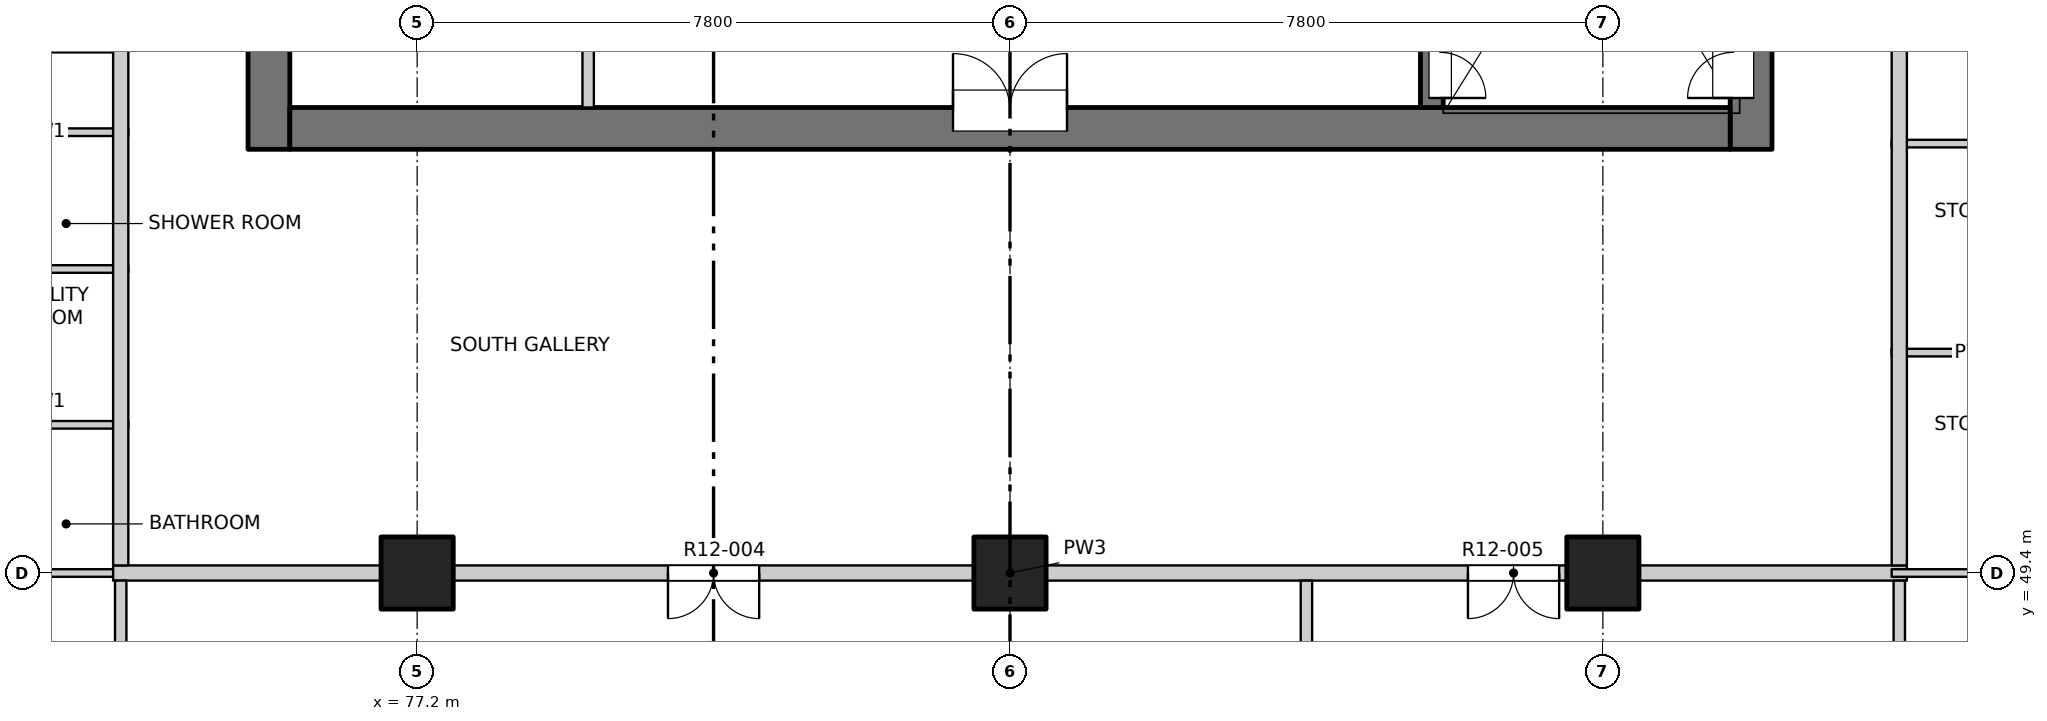
"""IFC4 building model, lengths in metres.
Left out: names, types, materials, properties, quantities, classifications, styles, units other than length and angle.
Written with IfcOpenShell. Run it as: python <this file> out.ifc"""

import sys

from ifc_helpers import new_model, si_unit, direction, frame, frame_2d, origin, origin_2d, place, context, subcontext, project, spatial, rectangle, extrude, element, fill, save


model = new_model("IFC4")
c1 = context("Model", 3, precision=1e-05, world=origin(), true_north=direction((0.0, 1.0)))
c2 = subcontext(c1, "Body", "Model", "MODEL_VIEW")
j1 = project(units=[si_unit("LENGTHUNIT", "METRE"), si_unit("PLANEANGLEUNIT", "RADIAN")], contexts=[c1])
p1 = place(None, origin())
s1 = spatial("IfcSite", under=j1, at=p1, CompositionType="ELEMENT")
p2 = place(p1, origin())
s2 = spatial("IfcBuilding", under=s1, at=p2, CompositionType="ELEMENT")
p3 = place(p2, frame((0.0, 0.0, 137.3)))
s3 = spatial("IfcBuildingStorey", under=s2, at=p3, CompositionType="ELEMENT", Elevation=137.3)
for number, where, z_axis, x_axis in (
    (1, (77.2, 49.4, -0.25), (0.0, 0.0, 1.0), (1.0, 0.0, 0.0)),
    (2, (85.0, 49.4, -0.25), (0.0, 0.0, 1.0), (1.0, 0.0, 0.0)),
    (3, (92.8, 49.4, -0.25), (0.0, 0.0, 1.0), (1.0, 0.0, 0.0)),
):
    element("IfcColumn", number, at=place(p3, frame(where, z_axis=z_axis, x_axis=x_axis)), inside=s3, PredefinedType="COLUMN", context=c2, shape_type="SweptSolid", body=[
        extrude(rectangle(XDim=0.95, YDim=0.95, at=origin_2d()), origin(), (0.0, 0.0, 1.0), 3.4),
    ])
p4 = place(p3, frame((75.25, 54.975, -0.25), z_axis=(0.0, 0.0, 1.0), x_axis=(0.0, 1.0, 0.0)))
e4 = element("IfcWall", 4, at=p4, inside=s3, PredefinedType="SOLIDWALL", context=c2, shape_type="SweptSolid", body=[
    extrude(rectangle(XDim=22.325, YDim=0.55, at=frame_2d((11.163, 0.0))), origin(), (0.0, 0.0, 1.0), 3.4),
])
p5 = place(p4, frame((7.475, 0.0, 0.25)))
e5 = element("IfcOpeningElement", 5, at=p5, cuts=e4, PredefinedType="OPENING", context=c2, shape_type="SweptSolid", body=[
    extrude(rectangle(XDim=0.9, YDim=2.1, at=frame_2d((0.45, 1.05))), frame((0.0, 0.285, 0.0), z_axis=(0.0, -1.0, 0.0), x_axis=(1.0, 0.0, 0.0)), (0.0, 0.0, 1.0), 0.57),
])
p6 = place(p4, frame((13.775, 0.0, 0.25)))
e6 = element("IfcOpeningElement", 6, at=p6, cuts=e4, PredefinedType="OPENING", context=c2, shape_type="SweptSolid", body=[
    extrude(rectangle(XDim=0.9, YDim=2.1, at=frame_2d((0.45, 1.05))), frame((0.0, 0.285, 0.0), z_axis=(0.0, -1.0, 0.0), x_axis=(1.0, 0.0, 0.0)), (0.0, 0.0, 1.0), 0.57),
])
p7 = place(p4, frame((20.075, 0.0, 0.25)))
e7 = element("IfcOpeningElement", 7, at=p7, cuts=e4, PredefinedType="OPENING", context=c2, shape_type="SweptSolid", body=[
    extrude(rectangle(XDim=0.9, YDim=2.1, at=frame_2d((0.45, 1.05))), frame((0.0, 0.285, 0.0), z_axis=(0.0, -1.0, 0.0), x_axis=(1.0, 0.0, 0.0)), (0.0, 0.0, 1.0), 0.57),
])
p8 = place(p3, frame((94.75, 54.975, -0.25), z_axis=(0.0, 0.0, 1.0), x_axis=(0.0, 1.0, 0.0)))
e8 = element("IfcWall", 8, at=p8, inside=s3, PredefinedType="SOLIDWALL", context=c2, shape_type="SweptSolid", body=[
    extrude(rectangle(XDim=6.975, YDim=0.55, at=frame_2d((3.487, 0.0))), origin(), (0.0, 0.0, 1.0), 3.4),
])
p9 = place(p8, frame((0.675, 0.0, 0.25)))
e9 = element("IfcOpeningElement", 9, at=p9, cuts=e8, PredefinedType="OPENING", context=c2, shape_type="SweptSolid", body=[
    extrude(rectangle(XDim=1.2, YDim=2.1, at=frame_2d((0.6, 1.05))), frame((0.0, 0.285, 0.0), z_axis=(0.0, -1.0, 0.0), x_axis=(1.0, 0.0, 0.0)), (0.0, 0.0, 1.0), 0.57),
])
p10 = place(p3, frame((75.525, 55.25, -0.25), z_axis=(0.0, 0.0, 1.0), x_axis=(1.0, 0.0, 0.0)))
e10 = element("IfcWall", 10, at=p10, inside=s3, PredefinedType="SOLIDWALL", context=c2, shape_type="SweptSolid", body=[
    extrude(rectangle(XDim=18.95, YDim=0.55, at=frame_2d((9.475, 0.0))), origin(), (0.0, 0.0, 1.0), 3.4),
])
p11 = place(p10, frame((8.725, 0.0, 0.25)))
e11 = element("IfcOpeningElement", 11, at=p11, cuts=e10, PredefinedType="OPENING", context=c2, shape_type="SweptSolid", body=[
    extrude(rectangle(XDim=1.5, YDim=2.1, at=frame_2d((0.75, 1.05))), frame((0.0, 0.285, 0.0), z_axis=(0.0, -1.0, 0.0), x_axis=(1.0, 0.0, 0.0)), (0.0, 0.0, 1.0), 0.57),
])
p12 = place(p3, frame((90.55, 55.525, -0.25), z_axis=(0.0, 0.0, 1.0), x_axis=(0.0, 1.0, 0.0)))
e12 = element("IfcWall", 12, at=p12, inside=s3, PredefinedType="SOLIDWALL", context=c2, shape_type="SweptSolid", body=[
    extrude(rectangle(XDim=6.425, YDim=0.3, at=frame_2d((3.212, 0.0))), origin(), (0.0, 0.0, 1.0), 3.4),
])
p13 = place(p12, frame((0.125, 0.0, 0.25)))
e13 = element("IfcOpeningElement", 13, at=p13, cuts=e12, PredefinedType="OPENING", context=c2, shape_type="SweptSolid", body=[
    extrude(rectangle(XDim=1.2, YDim=2.1, at=frame_2d((0.6, 1.05))), frame((0.0, 0.16, 0.0), z_axis=(0.0, -1.0, 0.0), x_axis=(1.0, 0.0, 0.0)), (0.0, 0.0, 1.0), 0.32),
])
p14 = place(p3, frame((65.8, 49.4, 0.0), z_axis=(0.0, 0.0, 1.0), x_axis=(1.0, 0.0, 0.0)))
e14 = element("IfcWall", 14, at=p14, inside=s3, PredefinedType="PARTITIONING", context=c2, shape_type="SweptSolid", body=[
    extrude(rectangle(XDim=7.6, YDim=0.1, at=frame_2d((3.8, 0.0))), origin(), (0.0, 0.0, 1.0), 3.15),
])
p15 = place(p14, frame((4.19, 0.0, 0.0)))
e15 = element("IfcOpeningElement", 15, at=p15, cuts=e14, PredefinedType="OPENING", context=c2, shape_type="SweptSolid", body=[
    extrude(rectangle(XDim=0.9, YDim=2.1, at=frame_2d((0.45, 1.05))), frame((0.0, 0.06, 0.0), z_axis=(0.0, -1.0, 0.0), x_axis=(1.0, 0.0, 0.0)), (0.0, 0.0, 1.0), 0.12),
])
p16 = place(p3, frame((73.2, 49.4, 0.0), z_axis=(0.0, 0.0, 1.0), x_axis=(1.0, 0.0, 0.0)))
e16 = element("IfcWall", 16, at=p16, inside=s3, PredefinedType="PARTITIONING", context=c2, shape_type="SweptSolid", body=[
    extrude(rectangle(XDim=23.6, YDim=0.2, at=frame_2d((11.8, 0.0))), origin(), (0.0, 0.0, 1.0), 3.15),
])
p17 = place(p16, frame((7.3, 0.0, 0.0)))
e17 = element("IfcOpeningElement", 17, at=p17, cuts=e16, PredefinedType="OPENING", context=c2, shape_type="SweptSolid", body=[
    extrude(rectangle(XDim=1.2, YDim=2.1, at=frame_2d((0.6, 1.05))), frame((0.0, 0.11, 0.0), z_axis=(0.0, -1.0, 0.0), x_axis=(1.0, 0.0, 0.0)), (0.0, 0.0, 1.0), 0.22),
])
p18 = place(p16, frame((17.825, 0.0, 0.0)))
e18 = element("IfcOpeningElement", 18, at=p18, cuts=e16, PredefinedType="OPENING", context=c2, shape_type="SweptSolid", body=[
    extrude(rectangle(XDim=1.2, YDim=2.1, at=frame_2d((0.6, 1.05))), frame((0.0, 0.11, 0.0), z_axis=(0.0, -1.0, 0.0), x_axis=(1.0, 0.0, 0.0)), (0.0, 0.0, 1.0), 0.22),
])
p19 = place(p3, frame((96.6, 49.4, 0.0), z_axis=(0.0, 0.0, 1.0), x_axis=(1.0, 0.0, 0.0)))
e19 = element("IfcWall", 19, at=p19, inside=s3, PredefinedType="PARTITIONING", context=c2, shape_type="SweptSolid", body=[
    extrude(rectangle(XDim=7.6, YDim=0.1, at=frame_2d((3.8, 0.0))), origin(), (0.0, 0.0, 1.0), 3.15),
])
p20 = place(p19, frame((2.51, 0.0, 0.0)))
e20 = element("IfcOpeningElement", 20, at=p20, cuts=e19, PredefinedType="OPENING", context=c2, shape_type="SweptSolid", body=[
    extrude(rectangle(XDim=0.9, YDim=2.1, at=frame_2d((0.45, 1.05))), frame((0.0, 0.06, 0.0), z_axis=(0.0, -1.0, 0.0), x_axis=(1.0, 0.0, 0.0)), (0.0, 0.0, 1.0), 0.12),
])
for number, where, z_axis, x_axis in (
    (21, (71.18, 51.35, 0.0), (0.0, 0.0, 1.0), (1.0, 0.0, 0.0)),
    (22, (96.6, 52.3, 0.0), (0.0, 0.0, 1.0), (1.0, 0.0, 0.0)),
    (23, (71.18, 53.4, 0.0), (0.0, 0.0, 1.0), (1.0, 0.0, 0.0)),
    (24, (96.6, 55.05, 0.0), (0.0, 0.0, 1.0), (1.0, 0.0, 0.0)),
    (25, (71.18, 55.2, 0.0), (0.0, 0.0, 1.0), (1.0, 0.0, 0.0)),
):
    element("IfcWall", number, at=place(p3, frame(where, z_axis=z_axis, x_axis=x_axis)), inside=s3, PredefinedType="PARTITIONING", context=c2, shape_type="SweptSolid", body=[
        extrude(rectangle(XDim=2.22, YDim=0.1, at=frame_2d((1.11, 0.0))), origin(), (0.0, 0.0, 1.0), 3.15),
    ])
p21 = place(p3, frame((73.3, 45.8, 0.0), z_axis=(0.0, 0.0, 1.0), x_axis=(0.0, 1.0, 0.0)))
e26 = element("IfcWall", 26, at=p21, inside=s3, PredefinedType="PARTITIONING", context=c2, shape_type="SweptSolid", body=[
    extrude(rectangle(XDim=3.5, YDim=0.15, at=frame_2d((1.75, 0.0))), origin(), (0.0, 0.0, 1.0), 3.15),
])
p22 = place(p3, frame((73.3, 49.5, 0.0), z_axis=(0.0, 0.0, 1.0), x_axis=(0.0, 1.0, 0.0)))
e27 = element("IfcWall", 27, at=p22, inside=s3, PredefinedType="PARTITIONING", context=c2, shape_type="SweptSolid", body=[
    extrude(rectangle(XDim=34.7, YDim=0.2, at=frame_2d((17.35, 0.0))), origin(), (0.0, 0.0, 1.0), 3.15),
])
p23 = place(p22, frame((6.975, 0.0, 0.0)))
e28 = element("IfcOpeningElement", 28, at=p23, cuts=e27, PredefinedType="OPENING", context=c2, shape_type="SweptSolid", body=[
    extrude(rectangle(XDim=1.0, YDim=2.1, at=frame_2d((0.5, 1.05))), frame((0.0, 0.11, 0.0), z_axis=(0.0, -1.0, 0.0), x_axis=(1.0, 0.0, 0.0)), (0.0, 0.0, 1.0), 0.22),
])
p24 = place(p22, frame((18.125, 0.0, 0.0)))
e29 = element("IfcOpeningElement", 29, at=p24, cuts=e27, PredefinedType="OPENING", context=c2, shape_type="SweptSolid", body=[
    extrude(rectangle(XDim=1.0, YDim=2.1, at=frame_2d((0.5, 1.05))), frame((0.0, 0.11, 0.0), z_axis=(0.0, -1.0, 0.0), x_axis=(1.0, 0.0, 0.0)), (0.0, 0.0, 1.0), 0.22),
])
p25 = place(p3, frame((79.45, 55.525, 0.0), z_axis=(0.0, 0.0, 1.0), x_axis=(0.0, 1.0, 0.0)))
e30 = element("IfcWall", 30, at=p25, inside=s3, PredefinedType="PARTITIONING", context=c2, shape_type="SweptSolid", body=[
    extrude(rectangle(XDim=5.375, YDim=0.15, at=frame_2d((2.688, 0.0))), origin(), (0.0, 0.0, 1.0), 3.15),
])
p26 = place(p25, frame((2.175, 0.0, 0.0)))
e31 = element("IfcOpeningElement", 31, at=p26, cuts=e30, PredefinedType="OPENING", context=c2, shape_type="SweptSolid", body=[
    extrude(rectangle(XDim=0.9, YDim=2.1, at=frame_2d((0.45, 1.05))), frame((0.0, 0.085, 0.0), z_axis=(0.0, -1.0, 0.0), x_axis=(1.0, 0.0, 0.0)), (0.0, 0.0, 1.0), 0.17),
])
p27 = place(p3, frame((88.9, 45.8, 0.0), z_axis=(0.0, 0.0, 1.0), x_axis=(0.0, 1.0, 0.0)))
e32 = element("IfcWall", 32, at=p27, inside=s3, PredefinedType="PARTITIONING", context=c2, shape_type="SweptSolid", body=[
    extrude(rectangle(XDim=3.5, YDim=0.15, at=frame_2d((1.75, 0.0))), origin(), (0.0, 0.0, 1.0), 2.55),
])
p28 = place(p3, frame((96.7, 45.8, 0.0), z_axis=(0.0, 0.0, 1.0), x_axis=(0.0, 1.0, 0.0)))
e33 = element("IfcWall", 33, at=p28, inside=s3, PredefinedType="PARTITIONING", context=c2, shape_type="SweptSolid", body=[
    extrude(rectangle(XDim=3.5, YDim=0.15, at=frame_2d((1.75, 0.0))), origin(), (0.0, 0.0, 1.0), 3.15),
])
p29 = place(p3, frame((96.7, 49.5, 0.0), z_axis=(0.0, 0.0, 1.0), x_axis=(0.0, 1.0, 0.0)))
e34 = element("IfcWall", 34, at=p29, inside=s3, PredefinedType="PARTITIONING", context=c2, shape_type="SweptSolid", body=[
    extrude(rectangle(XDim=34.7, YDim=0.2, at=frame_2d((17.35, 0.0))), origin(), (0.0, 0.0, 1.0), 3.15),
])
p30 = place(p29, frame((13.325, 0.0, 0.0)))
e35 = element("IfcOpeningElement", 35, at=p30, cuts=e34, PredefinedType="OPENING", context=c2, shape_type="SweptSolid", body=[
    extrude(rectangle(XDim=1.0, YDim=2.1, at=frame_2d((0.5, 1.05))), frame((0.0, 0.11, 0.0), z_axis=(0.0, -1.0, 0.0), x_axis=(1.0, 0.0, 0.0)), (0.0, 0.0, 1.0), 0.22),
])
p31 = place(p29, frame((29.625, 0.0, 0.0)))
e36 = element("IfcOpeningElement", 36, at=p31, cuts=e34, PredefinedType="OPENING", context=c2, shape_type="SweptSolid", body=[
    extrude(rectangle(XDim=1.0, YDim=2.1, at=frame_2d((0.5, 1.05))), frame((0.0, 0.11, 0.0), z_axis=(0.0, -1.0, 0.0), x_axis=(1.0, 0.0, 0.0)), (0.0, 0.0, 1.0), 0.22),
])
p32 = place(p17, origin())
e37 = element("IfcDoor", 37, at=p32, inside=s3, OperationType="DOUBLE_DOOR_SINGLE_SWING", PredefinedType="DOOR", context=c2, shape_type="SweptSolid", body=[
    extrude(rectangle(XDim=1.2, YDim=2.1, at=frame_2d((0.6, 1.05))), frame((0.0, 0.025, 0.0), z_axis=(0.0, -1.0, 0.0), x_axis=(1.0, 0.0, 0.0)), (0.0, 0.0, 1.0), 0.05),
])
fill(e17, e37)
p33 = place(p18, origin())
e38 = element("IfcDoor", 38, at=p33, inside=s3, OperationType="DOUBLE_DOOR_SINGLE_SWING", PredefinedType="DOOR", context=c2, shape_type="SweptSolid", body=[
    extrude(rectangle(XDim=1.2, YDim=2.1, at=frame_2d((0.6, 1.05))), frame((0.0, 0.025, 0.0), z_axis=(0.0, -1.0, 0.0), x_axis=(1.0, 0.0, 0.0)), (0.0, 0.0, 1.0), 0.05),
])
fill(e18, e38)
p34 = place(p11, origin())
e39 = element("IfcDoor", 39, at=p34, inside=s3, OperationType="DOUBLE_DOOR_SINGLE_SWING", PredefinedType="DOOR", context=c2, shape_type="SweptSolid", body=[
    extrude(rectangle(XDim=1.5, YDim=2.1, at=frame_2d((0.75, 1.05))), frame((0.0, 0.26, 0.0), z_axis=(0.0, -1.0, 0.0), x_axis=(1.0, 0.0, 0.0)), (0.0, 0.0, 1.0), 0.05),
])
fill(e11, e39)
p35 = place(p13, origin())
e40 = element("IfcDoor", 40, at=p35, inside=s3, OperationType="DOUBLE_DOOR_SINGLE_SWING", PredefinedType="DOOR", context=c2, shape_type="SweptSolid", body=[
    extrude(rectangle(XDim=1.2, YDim=2.1, at=frame_2d((0.6, 1.05))), frame((0.0, -0.085, 0.0), z_axis=(0.0, -1.0, 0.0), x_axis=(1.0, 0.0, 0.0)), (0.0, 0.0, 1.0), 0.05),
])
fill(e13, e40)
p36 = place(p9, origin())
e41 = element("IfcDoor", 41, at=p36, inside=s3, OperationType="DOUBLE_DOOR_SINGLE_SWING", PredefinedType="DOOR", context=c2, shape_type="SweptSolid", body=[
    extrude(rectangle(XDim=1.2, YDim=2.1, at=frame_2d((0.6, 1.05))), frame((0.0, 0.26, 0.0), z_axis=(0.0, -1.0, 0.0), x_axis=(1.0, 0.0, 0.0)), (0.0, 0.0, 1.0), 0.05),
])
fill(e9, e41)
save(model, sys.argv[1])
